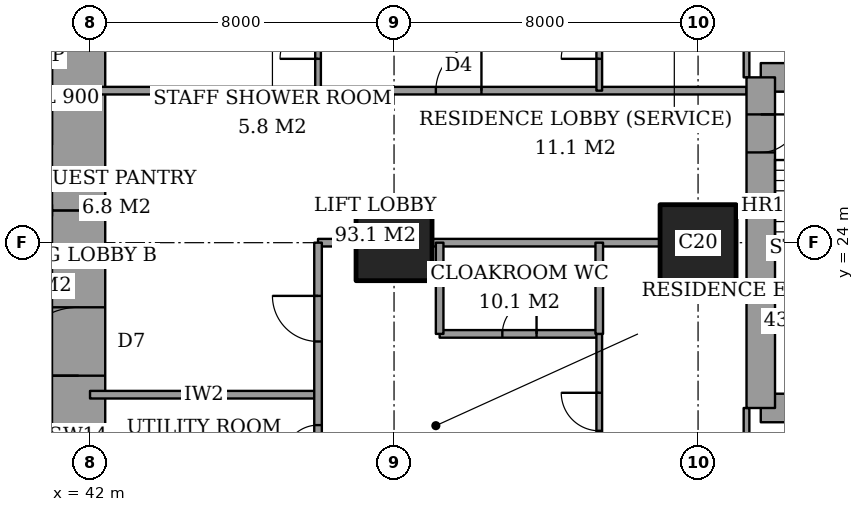
"""IFC4 building model, lengths in metres.
Left out: names, types, materials, properties, quantities, classifications, styles, units other than length and angle.
Written with IfcOpenShell. Run it as: python <this file> out.ifc"""

import sys

from ifc_helpers import new_model, si_unit, direction, frame, frame_2d, origin, origin_2d, place, context, subcontext, project, spatial, rectangle, extrude, element, fill, save


model = new_model("IFC4")
c1 = context("Model", 3, precision=1e-05, world=origin(), true_north=direction((0.0, 1.0)))
c2 = subcontext(c1, "Body", "Model", "MODEL_VIEW")
j1 = project(units=[si_unit("LENGTHUNIT", "METRE"), si_unit("PLANEANGLEUNIT", "RADIAN")], contexts=[c1])
p1 = place(None, origin())
s1 = spatial("IfcSite", under=j1, at=p1, CompositionType="ELEMENT")
p2 = place(p1, origin())
s2 = spatial("IfcBuilding", under=s1, at=p2, CompositionType="ELEMENT")
p3 = place(p2, frame((0.0, 0.0, 168.2)))
s3 = spatial("IfcBuildingStorey", under=s2, at=p3, CompositionType="ELEMENT", Elevation=168.2)
for number, where, z_axis, x_axis in (
    (1, (50.0, 24.0, 0.0), (0.0, 0.0, 1.0), (1.0, 0.0, 0.0)),
    (2, (58.0, 24.0, 0.0), (0.0, 0.0, 1.0), (1.0, 0.0, 0.0)),
):
    element("IfcColumn", number, at=place(p3, frame(where, z_axis=z_axis, x_axis=x_axis)), inside=s3, PredefinedType="COLUMN", context=c2, shape_type="SweptSolid", body=[
        extrude(rectangle(XDim=2.0, YDim=2.0, at=origin_2d()), origin(), (0.0, 0.0, 1.0), 3.6),
    ])
p4 = place(p3, frame((41.7, 13.0, 0.0), z_axis=(0.0, 0.0, 1.0), x_axis=(0.0, 1.0, 0.0)))
e3 = element("IfcWall", 3, at=p4, inside=s3, PredefinedType="SHEAR", context=c2, shape_type="SweptSolid", body=[
    extrude(rectangle(XDim=11.85, YDim=1.4, at=frame_2d((5.925, 0.0))), origin(), (0.0, 0.0, 1.0), 3.6),
])
p5 = place(p4, frame((7.5, 0.0, 0.0)))
e4 = element("IfcOpeningElement", 4, at=p5, cuts=e3, PredefinedType="OPENING", context=c2, shape_type="SweptSolid", body=[
    extrude(rectangle(XDim=1.8, YDim=2.4, at=frame_2d((0.9, 1.2))), frame((0.0, 0.71, 0.0), z_axis=(0.0, -1.0, 0.0), x_axis=(1.0, 0.0, 0.0)), (0.0, 0.0, 1.0), 1.42),
])
p6 = place(p3, frame((41.7, 24.85, 0.0), z_axis=(0.0, 0.0, 1.0), x_axis=(0.0, 1.0, 0.0)))
e5 = element("IfcWall", 5, at=p6, inside=s3, PredefinedType="SHEAR", context=c2, shape_type="SweptSolid", body=[
    extrude(rectangle(XDim=10.15, YDim=1.4, at=frame_2d((5.075, 0.0))), origin(), (0.0, 0.0, 1.0), 3.6),
])
for number, where, z_axis, x_axis in (
    (6, (59.65, 19.65, 0.0), (0.0, 0.0, 1.0), (1.0, 0.0, 0.0)),
    (7, (64.1, 28.35, 0.0), (0.0, 0.0, 1.0), (-1.0, 0.0, 0.0)),
):
    element("IfcWall", number, at=place(p3, frame(where, z_axis=z_axis, x_axis=x_axis)), inside=s3, PredefinedType="SHEAR", context=c2, shape_type="SweptSolid", body=[
        extrude(rectangle(XDim=4.45, YDim=0.75, at=frame_2d((2.225, 0.0))), origin(), (0.0, 0.0, 1.0), 3.6),
    ])
p7 = place(p3, frame((59.65, 28.35, 0.0), z_axis=(0.0, 0.0, 1.0), x_axis=(0.0, -1.0, 0.0)))
e8 = element("IfcWall", 8, at=p7, inside=s3, PredefinedType="SHEAR", context=c2, shape_type="SweptSolid", body=[
    extrude(rectangle(XDim=8.7, YDim=0.75, at=frame_2d((4.35, 0.0))), origin(), (0.0, 0.0, 1.0), 3.6),
])
p8 = place(p7, frame((0.975, 0.0, 0.0)))
e9 = element("IfcOpeningElement", 9, at=p8, cuts=e8, PredefinedType="OPENING", context=c2, shape_type="SweptSolid", body=[
    extrude(rectangle(XDim=1.0, YDim=2.1, at=frame_2d((0.5, 1.05))), frame((0.0, 0.385, 0.0), z_axis=(0.0, -1.0, 0.0), x_axis=(1.0, 0.0, 0.0)), (0.0, 0.0, 1.0), 0.77),
])
p9 = place(p3, frame((42.0, 20.0, 0.0), z_axis=(0.0, 0.0, 1.0), x_axis=(1.0, 0.0, 0.0)))
e10 = element("IfcWall", 10, at=p9, inside=s3, PredefinedType="PARTITIONING", context=c2, shape_type="SweptSolid", body=[
    extrude(rectangle(XDim=6.0, YDim=0.2, at=frame_2d((3.0, 0.0))), origin(), (0.0, 0.0, 1.0), 3.25),
])
p10 = place(p3, frame((51.2, 21.6, 0.0), z_axis=(0.0, 0.0, 1.0), x_axis=(1.0, 0.0, 0.0)))
e11 = element("IfcWall", 11, at=p10, inside=s3, PredefinedType="PARTITIONING", context=c2, shape_type="SweptSolid", body=[
    extrude(rectangle(XDim=4.2, YDim=0.2, at=frame_2d((2.1, 0.0))), origin(), (0.0, 0.0, 1.0), 3.25),
])
p11 = place(p10, frame((1.65, 0.0, 0.0)))
e12 = element("IfcOpeningElement", 12, at=p11, cuts=e11, PredefinedType="OPENING", context=c2, shape_type="SweptSolid", body=[
    extrude(rectangle(XDim=0.9, YDim=2.1, at=frame_2d((0.45, 1.05))), frame((0.0, 0.11, 0.0), z_axis=(0.0, -1.0, 0.0), x_axis=(1.0, 0.0, 0.0)), (0.0, 0.0, 1.0), 0.22),
])
p12 = place(p3, frame((48.0, 24.0, 0.0), z_axis=(0.0, 0.0, 1.0), x_axis=(1.0, 0.0, 0.0)))
e13 = element("IfcWall", 13, at=p12, inside=s3, PredefinedType="PARTITIONING", context=c2, shape_type="SweptSolid", body=[
    extrude(rectangle(XDim=1.0, YDim=0.2, at=frame_2d((0.5, 0.0))), origin(), (0.0, 0.0, 1.0), 3.25),
])
p13 = place(p3, frame((51.0, 24.0, 0.0), z_axis=(0.0, 0.0, 1.0), x_axis=(1.0, 0.0, 0.0)))
e14 = element("IfcWall", 14, at=p13, inside=s3, PredefinedType="PARTITIONING", context=c2, shape_type="SweptSolid", body=[
    extrude(rectangle(XDim=6.0, YDim=0.2, at=frame_2d((3.0, 0.0))), origin(), (0.0, 0.0, 1.0), 3.25),
])
p14 = place(p3, frame((42.0, 28.0, 0.0), z_axis=(0.0, 0.0, 1.0), x_axis=(1.0, 0.0, 0.0)))
e15 = element("IfcWall", 15, at=p14, inside=s3, PredefinedType="PARTITIONING", context=c2, shape_type="SweptSolid", body=[
    extrude(rectangle(XDim=17.275, YDim=0.2, at=frame_2d((8.637, 0.0))), origin(), (0.0, 0.0, 1.0), 3.25),
])
p15 = place(p14, frame((9.1, 0.0, 0.0)))
e16 = element("IfcOpeningElement", 16, at=p15, cuts=e15, PredefinedType="OPENING", context=c2, shape_type="SweptSolid", body=[
    extrude(rectangle(XDim=1.2, YDim=2.4, at=frame_2d((0.6, 1.2))), frame((0.0, 0.11, 0.0), z_axis=(0.0, -1.0, 0.0), x_axis=(1.0, 0.0, 0.0)), (0.0, 0.0, 1.0), 0.22),
])
p16 = place(p3, frame((48.0, 17.5, 0.0), z_axis=(0.0, 0.0, 1.0), x_axis=(0.0, 1.0, 0.0)))
e17 = element("IfcWall", 17, at=p16, inside=s3, PredefinedType="PARTITIONING", context=c2, shape_type="SweptSolid", body=[
    extrude(rectangle(XDim=6.5, YDim=0.2, at=frame_2d((3.25, 0.0))), origin(), (0.0, 0.0, 1.0), 3.25),
])
p17 = place(p16, frame((3.9, 0.0, 0.0)))
e18 = element("IfcOpeningElement", 18, at=p17, cuts=e17, PredefinedType="OPENING", context=c2, shape_type="SweptSolid", body=[
    extrude(rectangle(XDim=1.2, YDim=2.4, at=frame_2d((0.6, 1.2))), frame((0.0, 0.11, 0.0), z_axis=(0.0, -1.0, 0.0), x_axis=(1.0, 0.0, 0.0)), (0.0, 0.0, 1.0), 0.22),
])
p18 = place(p16, frame((0.8, 0.0, 0.0)))
e19 = element("IfcOpeningElement", 19, at=p18, cuts=e17, PredefinedType="OPENING", context=c2, shape_type="SweptSolid", body=[
    extrude(rectangle(XDim=0.9, YDim=2.1, at=frame_2d((0.45, 1.05))), frame((0.0, 0.11, 0.0), z_axis=(0.0, -1.0, 0.0), x_axis=(1.0, 0.0, 0.0)), (0.0, 0.0, 1.0), 0.22),
])
p19 = place(p3, frame((48.0, 28.0, 0.0), z_axis=(0.0, 0.0, 1.0), x_axis=(0.0, 1.0, 0.0)))
e20 = element("IfcWall", 20, at=p19, inside=s3, PredefinedType="PARTITIONING", context=c2, shape_type="SweptSolid", body=[
    extrude(rectangle(XDim=9.4, YDim=0.15, at=frame_2d((4.7, 0.0))), origin(), (0.0, 0.0, 1.0), 3.25),
])
p20 = place(p19, frame((0.837, 0.0, 0.0)))
e21 = element("IfcOpeningElement", 21, at=p20, cuts=e20, PredefinedType="OPENING", context=c2, shape_type="SweptSolid", body=[
    extrude(rectangle(XDim=1.0, YDim=2.1, at=frame_2d((0.5, 1.05))), frame((0.0, 0.085, 0.0), z_axis=(0.0, -1.0, 0.0), x_axis=(1.0, 0.0, 0.0)), (0.0, 0.0, 1.0), 0.17),
])
for number, where, z_axis, x_axis in (
    (22, (51.2, 21.6, 0.0), (0.0, 0.0, 1.0), (0.0, 1.0, 0.0)),
    (23, (55.4, 21.6, 0.0), (0.0, 0.0, 1.0), (0.0, 1.0, 0.0)),
):
    element("IfcWall", number, at=place(p3, frame(where, z_axis=z_axis, x_axis=x_axis)), inside=s3, PredefinedType="PARTITIONING", context=c2, shape_type="SweptSolid", body=[
        extrude(rectangle(XDim=2.4, YDim=0.2, at=frame_2d((1.2, 0.0))), origin(), (0.0, 0.0, 1.0), 3.25),
    ])
p21 = place(p3, frame((55.4, 11.0, 0.0), z_axis=(0.0, 0.0, 1.0), x_axis=(0.0, 1.0, 0.0)))
e24 = element("IfcWall", 24, at=p21, inside=s3, PredefinedType="PARTITIONING", context=c2, shape_type="SweptSolid", body=[
    extrude(rectangle(XDim=10.6, YDim=0.15, at=frame_2d((5.3, 0.0))), origin(), (0.0, 0.0, 1.0), 3.25),
])
p22 = place(p21, frame((8.05, 0.0, 0.0)))
e25 = element("IfcOpeningElement", 25, at=p22, cuts=e24, PredefinedType="OPENING", context=c2, shape_type="SweptSolid", body=[
    extrude(rectangle(XDim=1.0, YDim=2.1, at=frame_2d((0.5, 1.05))), frame((0.0, 0.085, 0.0), z_axis=(0.0, -1.0, 0.0), x_axis=(1.0, 0.0, 0.0)), (0.0, 0.0, 1.0), 0.17),
])
p23 = place(p3, frame((55.4, 28.0, 0.0), z_axis=(0.0, 0.0, 1.0), x_axis=(0.0, 1.0, 0.0)))
e26 = element("IfcWall", 26, at=p23, inside=s3, PredefinedType="PARTITIONING", context=c2, shape_type="SweptSolid", body=[
    extrude(rectangle(XDim=9.4, YDim=0.15, at=frame_2d((4.7, 0.0))), origin(), (0.0, 0.0, 1.0), 3.25),
])
p24 = place(p23, frame((0.837, 0.0, 0.0)))
e27 = element("IfcOpeningElement", 27, at=p24, cuts=e26, PredefinedType="OPENING", context=c2, shape_type="SweptSolid", body=[
    extrude(rectangle(XDim=1.0, YDim=2.1, at=frame_2d((0.5, 1.05))), frame((0.0, 0.085, 0.0), z_axis=(0.0, -1.0, 0.0), x_axis=(1.0, 0.0, 0.0)), (0.0, 0.0, 1.0), 0.17),
])
p25 = place(p3, frame((59.275, 17.2, 0.0), z_axis=(0.0, 0.0, 1.0), x_axis=(0.0, 1.0, 0.0)))
e28 = element("IfcWall", 28, at=p25, inside=s3, PredefinedType="PARTITIONING", context=c2, shape_type="SweptSolid", body=[
    extrude(rectangle(XDim=2.45, YDim=0.15, at=frame_2d((1.225, 0.0))), origin(), (0.0, 0.0, 1.0), 3.25),
])
p26 = place(p25, frame((0.587, 0.0, 0.0)))
e29 = element("IfcOpeningElement", 29, at=p26, cuts=e28, PredefinedType="OPENING", context=c2, shape_type="SweptSolid", body=[
    extrude(rectangle(XDim=0.9, YDim=2.1, at=frame_2d((0.45, 1.05))), frame((0.0, 0.085, 0.0), z_axis=(0.0, -1.0, 0.0), x_axis=(1.0, 0.0, 0.0)), (0.0, 0.0, 1.0), 0.17),
])
p27 = place(p3, frame((59.275, 28.35, 0.0), z_axis=(0.0, 0.0, 1.0), x_axis=(0.0, 1.0, 0.0)))
e30 = element("IfcWall", 30, at=p27, inside=s3, PredefinedType="PARTITIONING", context=c2, shape_type="SweptSolid", body=[
    extrude(rectangle(XDim=2.45, YDim=0.15, at=frame_2d((1.225, 0.0))), origin(), (0.0, 0.0, 1.0), 3.25),
])
p28 = place(p27, frame((0.913, 0.0, 0.0)))
e31 = element("IfcOpeningElement", 31, at=p28, cuts=e30, PredefinedType="OPENING", context=c2, shape_type="SweptSolid", body=[
    extrude(rectangle(XDim=1.0, YDim=2.1, at=frame_2d((0.5, 1.05))), frame((0.0, 0.085, 0.0), z_axis=(0.0, -1.0, 0.0), x_axis=(1.0, 0.0, 0.0)), (0.0, 0.0, 1.0), 0.17),
])
p29 = place(p22, origin())
e32 = element("IfcDoor", 32, at=p29, inside=s3, OperationType="SINGLE_SWING_LEFT", PredefinedType="DOOR", context=c2, shape_type="SweptSolid", body=[
    extrude(rectangle(XDim=1.0, YDim=2.1, at=frame_2d((0.5, 1.05))), frame((0.0, 0.025, 0.0), z_axis=(0.0, -1.0, 0.0), x_axis=(1.0, 0.0, 0.0)), (0.0, 0.0, 1.0), 0.05),
])
fill(e25, e32)
p30 = place(p11, origin())
e33 = element("IfcDoor", 33, at=p30, inside=s3, OperationType="SINGLE_SWING_LEFT", PredefinedType="DOOR", context=c2, shape_type="SweptSolid", body=[
    extrude(rectangle(XDim=0.9, YDim=2.1, at=frame_2d((0.45, 1.05))), frame((0.0, 0.025, 0.0), z_axis=(0.0, -1.0, 0.0), x_axis=(1.0, 0.0, 0.0)), (0.0, 0.0, 1.0), 0.05),
])
fill(e12, e33)
p31 = place(p17, origin())
e34 = element("IfcDoor", 34, at=p31, inside=s3, OperationType="SINGLE_SWING_LEFT", PredefinedType="DOOR", context=c2, shape_type="SweptSolid", body=[
    extrude(rectangle(XDim=1.2, YDim=2.4, at=frame_2d((0.6, 1.2))), frame((0.0, 0.025, 0.0), z_axis=(0.0, -1.0, 0.0), x_axis=(1.0, 0.0, 0.0)), (0.0, 0.0, 1.0), 0.05),
])
fill(e18, e34)
p32 = place(p18, origin())
e35 = element("IfcDoor", 35, at=p32, inside=s3, OperationType="SINGLE_SWING_RIGHT", PredefinedType="DOOR", context=c2, shape_type="SweptSolid", body=[
    extrude(rectangle(XDim=0.9, YDim=2.1, at=frame_2d((0.45, 1.05))), frame((0.0, 0.025, 0.0), z_axis=(0.0, -1.0, 0.0), x_axis=(1.0, 0.0, 0.0)), (0.0, 0.0, 1.0), 0.05),
])
fill(e19, e35)
p33 = place(p24, origin())
e36 = element("IfcDoor", 36, at=p33, inside=s3, OperationType="SINGLE_SWING_RIGHT", PredefinedType="DOOR", context=c2, shape_type="SweptSolid", body=[
    extrude(rectangle(XDim=1.0, YDim=2.1, at=frame_2d((0.5, 1.05))), frame((0.0, 0.025, 0.0), z_axis=(0.0, -1.0, 0.0), x_axis=(1.0, 0.0, 0.0)), (0.0, 0.0, 1.0), 0.05),
])
fill(e27, e36)
p34 = place(p15, origin())
e37 = element("IfcDoor", 37, at=p34, inside=s3, OperationType="SINGLE_SWING_LEFT", PredefinedType="DOOR", context=c2, shape_type="SweptSolid", body=[
    extrude(rectangle(XDim=1.2, YDim=2.4, at=frame_2d((0.6, 1.2))), frame((0.0, 0.025, 0.0), z_axis=(0.0, -1.0, 0.0), x_axis=(1.0, 0.0, 0.0)), (0.0, 0.0, 1.0), 0.05),
])
fill(e16, e37)
p35 = place(p20, origin())
e38 = element("IfcDoor", 38, at=p35, inside=s3, OperationType="SINGLE_SWING_RIGHT", PredefinedType="DOOR", context=c2, shape_type="SweptSolid", body=[
    extrude(rectangle(XDim=1.0, YDim=2.1, at=frame_2d((0.5, 1.05))), frame((0.0, 0.025, 0.0), z_axis=(0.0, -1.0, 0.0), x_axis=(1.0, 0.0, 0.0)), (0.0, 0.0, 1.0), 0.05),
])
fill(e21, e38)
p36 = place(p5, origin())
e39 = element("IfcDoor", 39, at=p36, inside=s3, OperationType="DOUBLE_DOOR_DOUBLE_SWING", PredefinedType="DOOR", context=c2, shape_type="SweptSolid", body=[
    extrude(rectangle(XDim=1.8, YDim=2.4, at=frame_2d((0.9, 1.2))), frame((0.0, 0.025, 0.0), z_axis=(0.0, -1.0, 0.0), x_axis=(1.0, 0.0, 0.0)), (0.0, 0.0, 1.0), 0.05),
])
fill(e4, e39)
p37 = place(p8, origin())
e40 = element("IfcDoor", 40, at=p37, inside=s3, OperationType="SINGLE_SWING_RIGHT", PredefinedType="DOOR", context=c2, shape_type="SweptSolid", body=[
    extrude(rectangle(XDim=1.0, YDim=2.1, at=frame_2d((0.5, 1.05))), frame((0.0, 0.025, 0.0), z_axis=(0.0, -1.0, 0.0), x_axis=(1.0, 0.0, 0.0)), (0.0, 0.0, 1.0), 0.05),
])
fill(e9, e40)
save(model, sys.argv[1])
